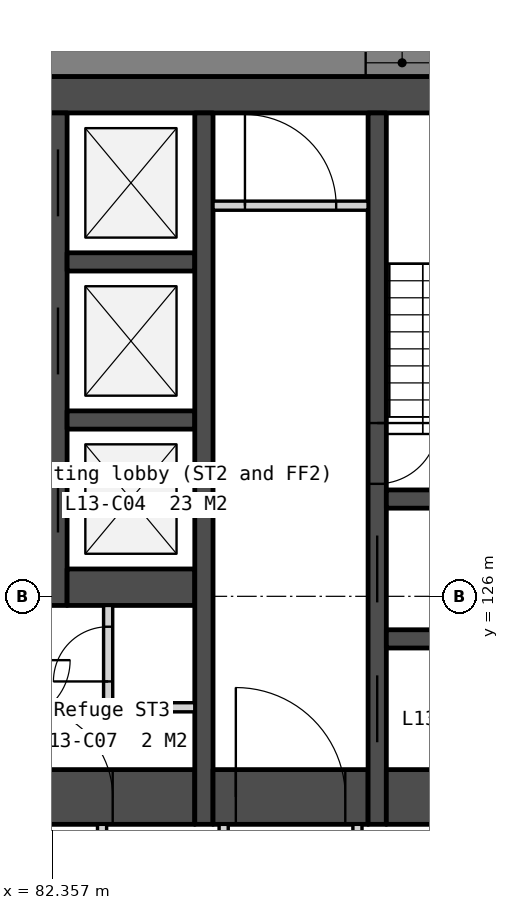
"""IFC4 building model, lengths in metres.
Left out: names, types, materials, properties, quantities, classifications, styles, units other than length and angle.
Written with IfcOpenShell. Run it as: python <this file> out.ifc"""

import sys

from ifc_helpers import new_model, si_unit, direction, frame, frame_2d, origin, place, context, subcontext, project, spatial, polyline, rectangle, outline, extrude, element, fill, save


model = new_model("IFC4")
c1 = context("Model", 3, precision=1e-05, world=origin(), true_north=direction((0.0, 1.0)))
c2 = subcontext(c1, "Body", "Model", "MODEL_VIEW")
j1 = project(units=[si_unit("LENGTHUNIT", "METRE"), si_unit("PLANEANGLEUNIT", "RADIAN")], contexts=[c1])
p1 = place(None, origin())
s1 = spatial("IfcSite", under=j1, at=p1, CompositionType="ELEMENT")
p2 = place(p1, origin())
s2 = spatial("IfcBuilding", under=s1, at=p2, CompositionType="ELEMENT")
p3 = place(p2, frame((0.0, 0.0, 59.5)))
s3 = spatial("IfcBuildingStorey", under=s2, at=p3, CompositionType="ELEMENT", Elevation=59.5)
p4 = place(p3, frame((66.0, 134.25, 0.0), z_axis=(0.0, 0.0, 1.0), x_axis=(1.0, 0.0, 0.0)))
e1 = element("IfcWall", 1, at=p4, inside=s3, PredefinedType="SOLIDWALL", context=c2, shape_type="SweptSolid", body=[
    extrude(rectangle(XDim=28.0, YDim=0.6, at=frame_2d((14.0, 0.0))), origin(), (0.0, 0.0, 1.0), 3.35),
])
p5 = place(p3, frame((81.8, 122.7, 0.0), z_axis=(0.0, 0.0, 1.0), x_axis=(1.0, 0.0, 0.0)))
e2 = element("IfcWall", 2, at=p5, inside=s3, PredefinedType="SOLIDWALL", context=c2, shape_type="SweptSolid", body=[
    extrude(rectangle(XDim=2.9, YDim=0.9, at=frame_2d((1.45, 0.0))), origin(), (0.0, 0.0, 1.0), 3.35),
])
p6 = place(p5, frame((0.05, 0.0, 0.0)))
e3 = element("IfcOpeningElement", 3, at=p6, cuts=e2, PredefinedType="OPENING", context=c2, shape_type="SweptSolid", body=[
    extrude(rectangle(XDim=1.5, YDim=2.1, at=frame_2d((0.75, 1.05))), frame((0.0, 0.46, 0.0), z_axis=(0.0, -1.0, 0.0), x_axis=(1.0, 0.0, 0.0)), (0.0, 0.0, 1.0), 0.92),
])
p7 = place(p3, frame((82.45, 133.95, 0.0), z_axis=(0.0, 0.0, 1.0), x_axis=(0.0, -1.0, 0.0)))
e4 = element("IfcWall", 4, at=p7, inside=s3, PredefinedType="SOLIDWALL", context=c2, shape_type="SweptSolid", body=[
    extrude(rectangle(XDim=8.1, YDim=0.3, at=frame_2d((4.05, 0.0))), origin(), (0.0, 0.0, 1.0), 3.35),
])
p8 = place(p7, frame((0.6, 0.0, 0.0)))
e5 = element("IfcOpeningElement", 5, at=p8, cuts=e4, PredefinedType="OPENING", context=c2, shape_type="SweptSolid", body=[
    extrude(rectangle(XDim=1.1, YDim=2.1, at=frame_2d((0.55, 1.05))), frame((0.0, 0.16, 0.0), z_axis=(0.0, -1.0, 0.0), x_axis=(1.0, 0.0, 0.0)), (0.0, 0.0, 1.0), 0.32),
])
p9 = place(p7, frame((3.2, 0.0, 0.0)))
e6 = element("IfcOpeningElement", 6, at=p9, cuts=e4, PredefinedType="OPENING", context=c2, shape_type="SweptSolid", body=[
    extrude(rectangle(XDim=1.1, YDim=2.1, at=frame_2d((0.55, 1.05))), frame((0.0, 0.16, 0.0), z_axis=(0.0, -1.0, 0.0), x_axis=(1.0, 0.0, 0.0)), (0.0, 0.0, 1.0), 0.32),
])
p10 = place(p7, frame((5.8, 0.0, 0.0)))
e7 = element("IfcOpeningElement", 7, at=p10, cuts=e4, PredefinedType="OPENING", context=c2, shape_type="SweptSolid", body=[
    extrude(rectangle(XDim=1.1, YDim=2.1, at=frame_2d((0.55, 1.05))), frame((0.0, 0.16, 0.0), z_axis=(0.0, -1.0, 0.0), x_axis=(1.0, 0.0, 0.0)), (0.0, 0.0, 1.0), 0.32),
])
for number, where, z_axis, x_axis in (
    (8, (82.6, 131.5, 0.0), (0.0, 0.0, 1.0), (1.0, 0.0, 0.0)),
    (9, (82.6, 128.9, 0.0), (0.0, 0.0, 1.0), (1.0, 0.0, 0.0)),
):
    element("IfcWall", number, at=place(p3, frame(where, z_axis=z_axis, x_axis=x_axis)), inside=s3, PredefinedType="SOLIDWALL", context=c2, shape_type="SweptSolid", body=[
        extrude(rectangle(XDim=2.1, YDim=0.3, at=frame_2d((1.05, 0.0))), origin(), (0.0, 0.0, 1.0), 3.35),
    ])
p11 = place(p3, frame((82.6, 126.15, 0.0), z_axis=(0.0, 0.0, 1.0), x_axis=(1.0, 0.0, 0.0)))
e10 = element("IfcWall", 10, at=p11, inside=s3, PredefinedType="SOLIDWALL", context=c2, shape_type="SweptSolid", body=[
    extrude(rectangle(XDim=2.1, YDim=0.6, at=frame_2d((1.05, 0.0))), origin(), (0.0, 0.0, 1.0), 3.35),
])
p12 = place(p3, frame((83.175, 122.25, 0.0), z_axis=(0.0, 0.0, 1.0), x_axis=(0.0, -1.0, 0.0)))
e11 = element("IfcWall", 11, at=p12, inside=s3, PredefinedType="PARTITIONING", context=c2, shape_type="SweptSolid", body=[
    extrude(rectangle(XDim=2.1, YDim=0.15, at=frame_2d((1.05, 0.0))), origin(), (0.0, 0.0, 1.0), 3.35),
])
p13 = place(p3, frame((83.275, 125.85, 0.0), z_axis=(0.0, 0.0, 1.0), x_axis=(0.0, -1.0, 0.0)))
e12 = element("IfcWall", 12, at=p13, inside=s3, PredefinedType="PARTITIONING", context=c2, shape_type="SweptSolid", body=[
    extrude(rectangle(XDim=1.75, YDim=0.15, at=frame_2d((0.875, 0.0))), origin(), (0.0, 0.0, 1.0), 3.35),
])
p14 = place(p13, frame((0.35, 0.0, 0.0)))
e13 = element("IfcOpeningElement", 13, at=p14, cuts=e12, PredefinedType="OPENING", context=c2, shape_type="SweptSolid", body=[
    extrude(rectangle(XDim=0.9, YDim=2.1, at=frame_2d((0.45, 1.05))), frame((0.0, 0.085, 0.0), z_axis=(0.0, -1.0, 0.0), x_axis=(1.0, 0.0, 0.0)), (0.0, 0.0, 1.0), 0.17),
])
p15 = place(p3, frame((83.35, 124.175, 0.0), z_axis=(0.0, 0.0, 1.0), x_axis=(1.0, 0.0, 0.0)))
e14 = element("IfcWall", 14, at=p15, inside=s3, PredefinedType="PARTITIONING", context=c2, shape_type="SweptSolid", body=[
    extrude(rectangle(XDim=1.35, YDim=0.15, at=frame_2d((0.675, 0.0))), origin(), (0.0, 0.0, 1.0), 3.35),
])
p16 = place(p3, frame((84.85, 133.95, 0.0), z_axis=(0.0, 0.0, 1.0), x_axis=(0.0, -1.0, 0.0)))
e15 = element("IfcWall", 15, at=p16, inside=s3, PredefinedType="SOLIDWALL", context=c2, shape_type="SweptSolid", body=[
    extrude(rectangle(XDim=11.7, YDim=0.3, at=frame_2d((5.85, 0.0))), origin(), (0.0, 0.0, 1.0), 3.35),
])
p17 = place(p3, frame((85.0, 132.425, 0.0), z_axis=(0.0, 0.0, 1.0), x_axis=(1.0, 0.0, 0.0)))
e16 = element("IfcWall", 16, at=p17, inside=s3, PredefinedType="PARTITIONING", context=c2, shape_type="SweptSolid", body=[
    extrude(rectangle(XDim=2.55, YDim=0.15, at=frame_2d((1.275, 0.0))), origin(), (0.0, 0.0, 1.0), 3.35),
])
p18 = place(p17, frame((0.525, 0.0, 0.0)))
e17 = element("IfcOpeningElement", 17, at=p18, cuts=e16, PredefinedType="OPENING", context=c2, shape_type="SweptSolid", body=[
    extrude(rectangle(XDim=1.5, YDim=2.1, at=frame_2d((0.75, 1.05))), frame((0.0, 0.085, 0.0), z_axis=(0.0, -1.0, 0.0), x_axis=(1.0, 0.0, 0.0)), (0.0, 0.0, 1.0), 0.17),
])
p19 = place(p3, frame((85.0, 122.7, 0.0), z_axis=(0.0, 0.0, 1.0), x_axis=(1.0, 0.0, 0.0)))
e18 = element("IfcWall", 18, at=p19, inside=s3, PredefinedType="SOLIDWALL", context=c2, shape_type="SweptSolid", body=[
    extrude(rectangle(XDim=2.55, YDim=0.9, at=frame_2d((1.275, 0.0))), origin(), (0.0, 0.0, 1.0), 3.35),
])
p20 = place(p19, frame((0.375, 0.0, 0.0)))
e19 = element("IfcOpeningElement", 19, at=p20, cuts=e18, PredefinedType="OPENING", context=c2, shape_type="SweptSolid", body=[
    extrude(rectangle(XDim=1.8, YDim=2.1, at=frame_2d((0.9, 1.05))), frame((0.0, 0.46, 0.0), z_axis=(0.0, -1.0, 0.0), x_axis=(1.0, 0.0, 0.0)), (0.0, 0.0, 1.0), 0.92),
])
p21 = place(p3, frame((85.175, 122.25, 0.0), z_axis=(0.0, 0.0, 1.0), x_axis=(0.0, -1.0, 0.0)))
e20 = element("IfcWall", 20, at=p21, inside=s3, PredefinedType="PARTITIONING", context=c2, shape_type="SweptSolid", body=[
    extrude(rectangle(XDim=2.1, YDim=0.15, at=frame_2d((1.05, 0.0))), origin(), (0.0, 0.0, 1.0), 3.35),
])
p22 = place(p21, frame((0.55, 0.0, 0.0)))
e21 = element("IfcOpeningElement", 21, at=p22, cuts=e20, PredefinedType="OPENING", context=c2, shape_type="SweptSolid", body=[
    extrude(rectangle(XDim=1.0, YDim=2.1, at=frame_2d((0.5, 1.05))), frame((0.0, 0.085, 0.0), z_axis=(0.0, -1.0, 0.0), x_axis=(1.0, 0.0, 0.0)), (0.0, 0.0, 1.0), 0.17),
])
p23 = place(p3, frame((87.375, 122.25, 0.0), z_axis=(0.0, 0.0, 1.0), x_axis=(0.0, -1.0, 0.0)))
e22 = element("IfcWall", 22, at=p23, inside=s3, PredefinedType="PARTITIONING", context=c2, shape_type="SweptSolid", body=[
    extrude(rectangle(XDim=2.1, YDim=0.15, at=frame_2d((1.05, 0.0))), origin(), (0.0, 0.0, 1.0), 3.35),
])
p24 = place(p3, frame((87.7, 133.95, 0.0), z_axis=(0.0, 0.0, 1.0), x_axis=(0.0, -1.0, 0.0)))
e23 = element("IfcWall", 23, at=p24, inside=s3, PredefinedType="SOLIDWALL", context=c2, shape_type="SweptSolid", body=[
    extrude(rectangle(XDim=11.7, YDim=0.3, at=frame_2d((5.85, 0.0))), origin(), (0.0, 0.0, 1.0), 3.35),
])
p25 = place(p24, frame((6.95, 0.0, 0.0)))
e24 = element("IfcOpeningElement", 24, at=p25, cuts=e23, PredefinedType="OPENING", context=c2, shape_type="SweptSolid", body=[
    extrude(rectangle(XDim=1.1, YDim=2.1, at=frame_2d((0.55, 1.05))), frame((0.0, 0.16, 0.0), z_axis=(0.0, -1.0, 0.0), x_axis=(1.0, 0.0, 0.0)), (0.0, 0.0, 1.0), 0.32),
])
p26 = place(p24, frame((5.1, 0.0, 0.0)))
e25 = element("IfcOpeningElement", 25, at=p26, cuts=e23, PredefinedType="OPENING", context=c2, shape_type="SweptSolid", body=[
    extrude(rectangle(XDim=1.0, YDim=2.1, at=frame_2d((0.5, 1.05))), frame((0.0, 0.16, 0.0), z_axis=(0.0, -1.0, 0.0), x_axis=(1.0, 0.0, 0.0)), (0.0, 0.0, 1.0), 0.32),
])
p27 = place(p24, frame((9.25, 0.0, 0.0)))
e26 = element("IfcOpeningElement", 26, at=p27, cuts=e23, PredefinedType="OPENING", context=c2, shape_type="SweptSolid", body=[
    extrude(rectangle(XDim=1.1, YDim=2.1, at=frame_2d((0.55, 1.05))), frame((0.0, 0.16, 0.0), z_axis=(0.0, -1.0, 0.0), x_axis=(1.0, 0.0, 0.0)), (0.0, 0.0, 1.0), 0.32),
])
for number, where, z_axis, x_axis in (
    (27, (87.85, 127.6, 0.0), (0.0, 0.0, 1.0), (1.0, 0.0, 0.0)),
    (28, (87.85, 125.3, 0.0), (0.0, 0.0, 1.0), (1.0, 0.0, 0.0)),
):
    element("IfcWall", number, at=place(p3, frame(where, z_axis=z_axis, x_axis=x_axis)), inside=s3, PredefinedType="SOLIDWALL", context=c2, shape_type="SweptSolid", body=[
        extrude(rectangle(XDim=2.55, YDim=0.3, at=frame_2d((1.275, 0.0))), origin(), (0.0, 0.0, 1.0), 3.35),
    ])
p28 = place(p3, frame((87.85, 122.7, 0.0), z_axis=(0.0, 0.0, 1.0), x_axis=(1.0, 0.0, 0.0)))
e29 = element("IfcWall", 29, at=p28, inside=s3, PredefinedType="SOLIDWALL", context=c2, shape_type="SweptSolid", body=[
    extrude(rectangle(XDim=2.55, YDim=0.9, at=frame_2d((1.275, 0.0))), origin(), (0.0, 0.0, 1.0), 3.35),
])
p29 = place(p3, frame((102.4, 134.775, -0.15), z_axis=(0.0, 0.0, 1.0), x_axis=(-1.0, 0.0, 0.0)))
e30 = element("IfcWall", 30, at=p29, inside=s3, PredefinedType="SOLIDWALL", context=c2, shape_type="SweptSolid", body=[
    extrude(outline(polyline([(44.8, 0.0), (44.8, 3.5), (0.0, 3.5), (0.0, 0.0), (44.8, 0.0)])), frame((0.0, 0.225, 0.0), z_axis=(0.0, -1.0, 0.0), x_axis=(1.0, 0.0, 0.0)), (0.0, 0.0, 1.0), 0.45),
])
p30 = place(p29, frame((3.03, 0.0, 1.05)))
e31 = element("IfcOpeningElement", 31, at=p30, cuts=e30, PredefinedType="OPENING", context=c2, shape_type="SweptSolid", body=[
    extrude(rectangle(XDim=1.2, YDim=1.5, at=frame_2d((0.6, 0.75))), frame((0.0, 0.235, 0.0), z_axis=(0.0, -1.0, 0.0), x_axis=(1.0, 0.0, 0.0)), (0.0, 0.0, 1.0), 0.47),
])
p31 = place(p29, frame((4.73, 0.0, 1.05)))
e32 = element("IfcOpeningElement", 32, at=p31, cuts=e30, PredefinedType="OPENING", context=c2, shape_type="SweptSolid", body=[
    extrude(rectangle(XDim=1.2, YDim=1.5, at=frame_2d((0.6, 0.75))), frame((0.0, 0.235, 0.0), z_axis=(0.0, -1.0, 0.0), x_axis=(1.0, 0.0, 0.0)), (0.0, 0.0, 1.0), 0.47),
])
p32 = place(p29, frame((11.99, 0.0, 1.05)))
e33 = element("IfcOpeningElement", 33, at=p32, cuts=e30, PredefinedType="OPENING", context=c2, shape_type="SweptSolid", body=[
    extrude(rectangle(XDim=1.2, YDim=1.5, at=frame_2d((0.6, 0.75))), frame((0.0, 0.235, 0.0), z_axis=(0.0, -1.0, 0.0), x_axis=(1.0, 0.0, 0.0)), (0.0, 0.0, 1.0), 0.47),
])
p33 = place(p29, frame((13.69, 0.0, 1.05)))
e34 = element("IfcOpeningElement", 34, at=p33, cuts=e30, PredefinedType="OPENING", context=c2, shape_type="SweptSolid", body=[
    extrude(rectangle(XDim=1.2, YDim=1.5, at=frame_2d((0.6, 0.75))), frame((0.0, 0.235, 0.0), z_axis=(0.0, -1.0, 0.0), x_axis=(1.0, 0.0, 0.0)), (0.0, 0.0, 1.0), 0.47),
])
p34 = place(p29, frame((20.95, 0.0, 1.05)))
e35 = element("IfcOpeningElement", 35, at=p34, cuts=e30, PredefinedType="OPENING", context=c2, shape_type="SweptSolid", body=[
    extrude(rectangle(XDim=1.2, YDim=1.5, at=frame_2d((0.6, 0.75))), frame((0.0, 0.235, 0.0), z_axis=(0.0, -1.0, 0.0), x_axis=(1.0, 0.0, 0.0)), (0.0, 0.0, 1.0), 0.47),
])
p35 = place(p29, frame((22.65, 0.0, 1.05)))
e36 = element("IfcOpeningElement", 36, at=p35, cuts=e30, PredefinedType="OPENING", context=c2, shape_type="SweptSolid", body=[
    extrude(rectangle(XDim=1.2, YDim=1.5, at=frame_2d((0.6, 0.75))), frame((0.0, 0.235, 0.0), z_axis=(0.0, -1.0, 0.0), x_axis=(1.0, 0.0, 0.0)), (0.0, 0.0, 1.0), 0.47),
])
p36 = place(p29, frame((29.91, 0.0, 1.05)))
e37 = element("IfcOpeningElement", 37, at=p36, cuts=e30, PredefinedType="OPENING", context=c2, shape_type="SweptSolid", body=[
    extrude(rectangle(XDim=1.2, YDim=1.5, at=frame_2d((0.6, 0.75))), frame((0.0, 0.235, 0.0), z_axis=(0.0, -1.0, 0.0), x_axis=(1.0, 0.0, 0.0)), (0.0, 0.0, 1.0), 0.47),
])
p37 = place(p29, frame((31.61, 0.0, 1.05)))
e38 = element("IfcOpeningElement", 38, at=p37, cuts=e30, PredefinedType="OPENING", context=c2, shape_type="SweptSolid", body=[
    extrude(rectangle(XDim=1.2, YDim=1.5, at=frame_2d((0.6, 0.75))), frame((0.0, 0.235, 0.0), z_axis=(0.0, -1.0, 0.0), x_axis=(1.0, 0.0, 0.0)), (0.0, 0.0, 1.0), 0.47),
])
p38 = place(p29, frame((38.87, 0.0, 1.05)))
e39 = element("IfcOpeningElement", 39, at=p38, cuts=e30, PredefinedType="OPENING", context=c2, shape_type="SweptSolid", body=[
    extrude(rectangle(XDim=1.2, YDim=1.5, at=frame_2d((0.6, 0.75))), frame((0.0, 0.235, 0.0), z_axis=(0.0, -1.0, 0.0), x_axis=(1.0, 0.0, 0.0)), (0.0, 0.0, 1.0), 0.47),
])
p39 = place(p29, frame((40.57, 0.0, 1.05)))
e40 = element("IfcOpeningElement", 40, at=p39, cuts=e30, PredefinedType="OPENING", context=c2, shape_type="SweptSolid", body=[
    extrude(rectangle(XDim=1.2, YDim=1.5, at=frame_2d((0.6, 0.75))), frame((0.0, 0.235, 0.0), z_axis=(0.0, -1.0, 0.0), x_axis=(1.0, 0.0, 0.0)), (0.0, 0.0, 1.0), 0.47),
])
p40 = place(p3, frame((83.105, 90.599, -0.15), z_axis=(0.0, 0.0, 1.0), x_axis=(0.499999201451, 0.866025864826, 0.0)))
e41 = element("IfcWall", 41, at=p40, inside=s3, PredefinedType="SOLIDWALL", context=c2, shape_type="SweptSolid", body=[
    extrude(outline(polyline([(44.8, 0.0), (44.8, 3.5), (0.0, 3.5), (0.0, 0.0), (44.8, 0.0)])), frame((0.0, 0.225, 0.0), z_axis=(0.0, -1.0, 0.0), x_axis=(1.0, 0.0, 0.0)), (0.0, 0.0, 1.0), 0.45),
])
p41 = place(p40, frame((3.03, 0.0, 1.05)))
e42 = element("IfcOpeningElement", 42, at=p41, cuts=e41, PredefinedType="OPENING", context=c2, shape_type="SweptSolid", body=[
    extrude(rectangle(XDim=1.2, YDim=1.5, at=frame_2d((0.6, 0.75))), frame((0.0, 0.235, 0.0), z_axis=(0.0, -1.0, 0.0), x_axis=(1.0, 0.0, 0.0)), (0.0, 0.0, 1.0), 0.47),
])
p42 = place(p40, frame((4.73, 0.0, 1.05)))
e43 = element("IfcOpeningElement", 43, at=p42, cuts=e41, PredefinedType="OPENING", context=c2, shape_type="SweptSolid", body=[
    extrude(rectangle(XDim=1.2, YDim=1.5, at=frame_2d((0.6, 0.75))), frame((0.0, 0.235, 0.0), z_axis=(0.0, -1.0, 0.0), x_axis=(1.0, 0.0, 0.0)), (0.0, 0.0, 1.0), 0.47),
])
p43 = place(p40, frame((11.99, 0.0, 1.05)))
e44 = element("IfcOpeningElement", 44, at=p43, cuts=e41, PredefinedType="OPENING", context=c2, shape_type="SweptSolid", body=[
    extrude(rectangle(XDim=1.2, YDim=1.5, at=frame_2d((0.6, 0.75))), frame((0.0, 0.235, 0.0), z_axis=(0.0, -1.0, 0.0), x_axis=(1.0, 0.0, 0.0)), (0.0, 0.0, 1.0), 0.47),
])
p44 = place(p40, frame((13.69, 0.0, 1.05)))
e45 = element("IfcOpeningElement", 45, at=p44, cuts=e41, PredefinedType="OPENING", context=c2, shape_type="SweptSolid", body=[
    extrude(rectangle(XDim=1.2, YDim=1.5, at=frame_2d((0.6, 0.75))), frame((0.0, 0.235, 0.0), z_axis=(0.0, -1.0, 0.0), x_axis=(1.0, 0.0, 0.0)), (0.0, 0.0, 1.0), 0.47),
])
p45 = place(p40, frame((20.95, 0.0, 1.05)))
e46 = element("IfcOpeningElement", 46, at=p45, cuts=e41, PredefinedType="OPENING", context=c2, shape_type="SweptSolid", body=[
    extrude(rectangle(XDim=1.2, YDim=1.5, at=frame_2d((0.6, 0.75))), frame((0.0, 0.235, 0.0), z_axis=(0.0, -1.0, 0.0), x_axis=(1.0, 0.0, 0.0)), (0.0, 0.0, 1.0), 0.47),
])
p46 = place(p40, frame((22.65, 0.0, 1.05)))
e47 = element("IfcOpeningElement", 47, at=p46, cuts=e41, PredefinedType="OPENING", context=c2, shape_type="SweptSolid", body=[
    extrude(rectangle(XDim=1.2, YDim=1.5, at=frame_2d((0.6, 0.75))), frame((0.0, 0.235, 0.0), z_axis=(0.0, -1.0, 0.0), x_axis=(1.0, 0.0, 0.0)), (0.0, 0.0, 1.0), 0.47),
])
p47 = place(p40, frame((29.91, 0.0, 1.05)))
e48 = element("IfcOpeningElement", 48, at=p47, cuts=e41, PredefinedType="OPENING", context=c2, shape_type="SweptSolid", body=[
    extrude(rectangle(XDim=1.2, YDim=1.5, at=frame_2d((0.6, 0.75))), frame((0.0, 0.235, 0.0), z_axis=(0.0, -1.0, 0.0), x_axis=(1.0, 0.0, 0.0)), (0.0, 0.0, 1.0), 0.47),
])
p48 = place(p40, frame((31.61, 0.0, 1.05)))
e49 = element("IfcOpeningElement", 49, at=p48, cuts=e41, PredefinedType="OPENING", context=c2, shape_type="SweptSolid", body=[
    extrude(rectangle(XDim=1.2, YDim=1.5, at=frame_2d((0.6, 0.75))), frame((0.0, 0.235, 0.0), z_axis=(0.0, -1.0, 0.0), x_axis=(1.0, 0.0, 0.0)), (0.0, 0.0, 1.0), 0.47),
])
p49 = place(p40, frame((38.87, 0.0, 1.05)))
e50 = element("IfcOpeningElement", 50, at=p49, cuts=e41, PredefinedType="OPENING", context=c2, shape_type="SweptSolid", body=[
    extrude(rectangle(XDim=1.2, YDim=1.5, at=frame_2d((0.6, 0.75))), frame((0.0, 0.235, 0.0), z_axis=(0.0, -1.0, 0.0), x_axis=(1.0, 0.0, 0.0)), (0.0, 0.0, 1.0), 0.47),
])
p50 = place(p40, frame((40.57, 0.0, 1.05)))
e51 = element("IfcOpeningElement", 51, at=p50, cuts=e41, PredefinedType="OPENING", context=c2, shape_type="SweptSolid", body=[
    extrude(rectangle(XDim=1.2, YDim=1.5, at=frame_2d((0.6, 0.75))), frame((0.0, 0.235, 0.0), z_axis=(0.0, -1.0, 0.0), x_axis=(1.0, 0.0, 0.0)), (0.0, 0.0, 1.0), 0.47),
])
p51 = place(p8, origin())
e52 = element("IfcDoor", 52, at=p51, inside=s3, OperationType="SLIDING_TO_LEFT", PredefinedType="DOOR", context=c2, shape_type="SweptSolid", body=[
    extrude(rectangle(XDim=1.1, YDim=2.1, at=frame_2d((0.55, 1.05))), frame((0.0, 0.025, 0.0), z_axis=(0.0, -1.0, 0.0), x_axis=(1.0, 0.0, 0.0)), (0.0, 0.0, 1.0), 0.05),
])
fill(e5, e52)
p52 = place(p9, origin())
e53 = element("IfcDoor", 53, at=p52, inside=s3, OperationType="SLIDING_TO_LEFT", PredefinedType="DOOR", context=c2, shape_type="SweptSolid", body=[
    extrude(rectangle(XDim=1.1, YDim=2.1, at=frame_2d((0.55, 1.05))), frame((0.0, 0.025, 0.0), z_axis=(0.0, -1.0, 0.0), x_axis=(1.0, 0.0, 0.0)), (0.0, 0.0, 1.0), 0.05),
])
fill(e6, e53)
p53 = place(p10, origin())
e54 = element("IfcDoor", 54, at=p53, inside=s3, OperationType="SLIDING_TO_LEFT", PredefinedType="DOOR", context=c2, shape_type="SweptSolid", body=[
    extrude(rectangle(XDim=1.1, YDim=2.1, at=frame_2d((0.55, 1.05))), frame((0.0, 0.025, 0.0), z_axis=(0.0, -1.0, 0.0), x_axis=(1.0, 0.0, 0.0)), (0.0, 0.0, 1.0), 0.05),
])
fill(e7, e54)
p54 = place(p25, origin())
e55 = element("IfcDoor", 55, at=p54, inside=s3, OperationType="SLIDING_TO_LEFT", PredefinedType="DOOR", context=c2, shape_type="SweptSolid", body=[
    extrude(rectangle(XDim=1.1, YDim=2.1, at=frame_2d((0.55, 1.05))), frame((0.0, 0.025, 0.0), z_axis=(0.0, -1.0, 0.0), x_axis=(1.0, 0.0, 0.0)), (0.0, 0.0, 1.0), 0.05),
])
fill(e24, e55)
p55 = place(p20, origin())
e56 = element("IfcDoor", 56, at=p55, inside=s3, OperationType="DOUBLE_DOOR_DOUBLE_SWING", PredefinedType="DOOR", context=c2, shape_type="SweptSolid", body=[
    extrude(rectangle(XDim=1.8, YDim=2.1, at=frame_2d((0.9, 1.05))), frame((0.0, 0.025, 0.0), z_axis=(0.0, -1.0, 0.0), x_axis=(1.0, 0.0, 0.0)), (0.0, 0.0, 1.0), 0.05),
])
fill(e19, e56)
p56 = place(p6, origin())
e57 = element("IfcDoor", 57, at=p56, inside=s3, OperationType="DOUBLE_DOOR_DOUBLE_SWING", PredefinedType="DOOR", context=c2, shape_type="SweptSolid", body=[
    extrude(rectangle(XDim=1.5, YDim=2.1, at=frame_2d((0.75, 1.05))), frame((0.0, 0.025, 0.0), z_axis=(0.0, -1.0, 0.0), x_axis=(1.0, 0.0, 0.0)), (0.0, 0.0, 1.0), 0.05),
])
fill(e3, e57)
p57 = place(p14, origin())
e58 = element("IfcDoor", 58, at=p57, inside=s3, OperationType="SINGLE_SWING_RIGHT", PredefinedType="DOOR", context=c2, shape_type="SweptSolid", body=[
    extrude(rectangle(XDim=0.9, YDim=2.1, at=frame_2d((0.45, 1.05))), frame((0.0, 0.025, 0.0), z_axis=(0.0, -1.0, 0.0), x_axis=(1.0, 0.0, 0.0)), (0.0, 0.0, 1.0), 0.05),
])
fill(e13, e58)
p58 = place(p18, origin())
e59 = element("IfcDoor", 59, at=p58, inside=s3, OperationType="DOUBLE_DOOR_DOUBLE_SWING", PredefinedType="DOOR", context=c2, shape_type="SweptSolid", body=[
    extrude(rectangle(XDim=1.5, YDim=2.1, at=frame_2d((0.75, 1.05))), frame((0.0, 0.025, 0.0), z_axis=(0.0, -1.0, 0.0), x_axis=(1.0, 0.0, 0.0)), (0.0, 0.0, 1.0), 0.05),
])
fill(e17, e59)
p59 = place(p26, origin())
e60 = element("IfcDoor", 60, at=p59, inside=s3, OperationType="SINGLE_SWING_LEFT", PredefinedType="DOOR", context=c2, shape_type="SweptSolid", body=[
    extrude(rectangle(XDim=1.0, YDim=2.1, at=frame_2d((0.5, 1.05))), frame((0.0, 0.025, 0.0), z_axis=(0.0, -1.0, 0.0), x_axis=(1.0, 0.0, 0.0)), (0.0, 0.0, 1.0), 0.05),
])
fill(e25, e60)
p60 = place(p27, origin())
e61 = element("IfcDoor", 61, at=p60, inside=s3, OperationType="SLIDING_TO_LEFT", PredefinedType="DOOR", context=c2, shape_type="SweptSolid", body=[
    extrude(rectangle(XDim=1.1, YDim=2.1, at=frame_2d((0.55, 1.05))), frame((0.0, 0.025, 0.0), z_axis=(0.0, -1.0, 0.0), x_axis=(1.0, 0.0, 0.0)), (0.0, 0.0, 1.0), 0.05),
])
fill(e26, e61)
p61 = place(p33, origin())
e62 = element("IfcWindow", 62, at=p61, inside=s3, PartitioningType="SINGLE_PANEL", PredefinedType="WINDOW", context=c2, shape_type="SweptSolid", body=[
    extrude(rectangle(XDim=1.2, YDim=1.5, at=frame_2d((0.6, 0.75))), frame((0.0, 0.03, 0.0), z_axis=(0.0, -1.0, 0.0), x_axis=(1.0, 0.0, 0.0)), (0.0, 0.0, 1.0), 0.06),
])
fill(e34, e62)
save(model, sys.argv[1])
